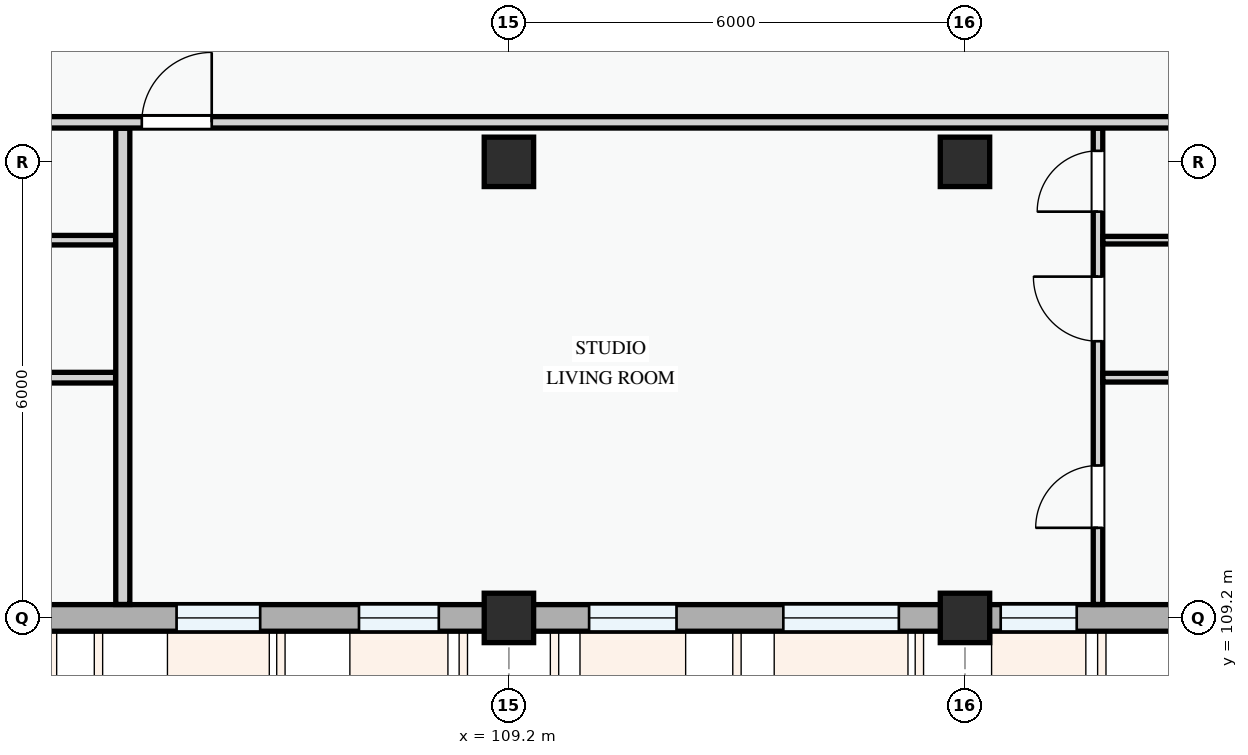
"""IFC4 building model, lengths in metres.
Left out: names, types, materials, properties, quantities, classifications, styles, units other than length and angle.
Written with IfcOpenShell. Run it as: python <this file> out.ifc"""

import sys

from ifc_helpers import new_model, si_unit, direction, frame, frame_2d, origin, origin_2d, place, context, subcontext, project, spatial, rectangle, extrude, element, fill, save


model = new_model("IFC4")
c1 = context("Model", 3, precision=1e-05, world=origin(), true_north=direction((0.0, 1.0)))
c2 = subcontext(c1, "Body", "Model", "MODEL_VIEW")
j1 = project(units=[si_unit("LENGTHUNIT", "METRE"), si_unit("PLANEANGLEUNIT", "RADIAN")], contexts=[c1])
p1 = place(None, origin())
s1 = spatial("IfcSite", under=j1, at=p1, CompositionType="ELEMENT")
p2 = place(p1, origin())
s2 = spatial("IfcBuilding", under=s1, at=p2, CompositionType="ELEMENT")
p3 = place(p2, frame((0.0, 0.0, 11.4)))
s3 = spatial("IfcBuildingStorey", under=s2, at=p3, CompositionType="ELEMENT", Elevation=11.4)
for number, where, z_axis, x_axis in (
    (1, (109.2, 109.2, 0.0), (0.0, 0.0, 1.0), (1.0, 0.0, 0.0)),
    (2, (109.2, 115.2, 0.0), (0.0, 0.0, 1.0), (1.0, 0.0, 0.0)),
    (3, (115.2, 109.2, 0.0), (0.0, 0.0, 1.0), (1.0, 0.0, 0.0)),
    (4, (115.2, 115.2, 0.0), (0.0, 0.0, 1.0), (1.0, 0.0, 0.0)),
):
    element("IfcColumn", number, at=place(p3, frame(where, z_axis=z_axis, x_axis=x_axis)), inside=s3, PredefinedType="COLUMN", context=c2, shape_type="SweptSolid", body=[
        extrude(rectangle(XDim=0.65, YDim=0.65, at=origin_2d()), origin(), (0.0, 0.0, 1.0), 3.3),
    ])
p4 = place(p3, frame((100.8, 109.2, 0.0), z_axis=(0.0, 0.0, 1.0), x_axis=(1.0, 0.0, 0.0)))
e5 = element("IfcWall", 5, at=p4, inside=s3, PredefinedType="STANDARD", context=c2, shape_type="SweptSolid", body=[
    extrude(rectangle(XDim=8.4, YDim=0.35, at=frame_2d((4.2, 0.0))), origin(), (0.0, 0.0, 1.0), 2.375),
])
p5 = place(p4, frame((1.18, 0.0, 0.78)))
e6 = element("IfcOpeningElement", 6, at=p5, cuts=e5, PredefinedType="OPENING", context=c2, shape_type="SweptSolid", body=[
    extrude(rectangle(XDim=1.15, YDim=1.25, at=frame_2d((0.575, 0.625))), frame((0.0, 0.185, 0.0), z_axis=(0.0, -1.0, 0.0), x_axis=(1.0, 0.0, 0.0)), (0.0, 0.0, 1.0), 0.37),
])
p6 = place(p4, frame((4.028, 0.0, 0.78)))
e7 = element("IfcOpeningElement", 7, at=p6, cuts=e5, PredefinedType="OPENING", context=c2, shape_type="SweptSolid", body=[
    extrude(rectangle(XDim=1.1, YDim=1.3, at=frame_2d((0.55, 0.65))), frame((0.0, 0.185, 0.0), z_axis=(0.0, -1.0, 0.0), x_axis=(1.0, 0.0, 0.0)), (0.0, 0.0, 1.0), 0.37),
])
p7 = place(p4, frame((6.427, 0.0, 0.78)))
e8 = element("IfcOpeningElement", 8, at=p7, cuts=e5, PredefinedType="OPENING", context=c2, shape_type="SweptSolid", body=[
    extrude(rectangle(XDim=1.05, YDim=1.2, at=frame_2d((0.525, 0.6))), frame((0.0, 0.185, 0.0), z_axis=(0.0, -1.0, 0.0), x_axis=(1.0, 0.0, 0.0)), (0.0, 0.0, 1.0), 0.37),
])
p8 = place(p3, frame((109.2, 109.2, 0.0), z_axis=(0.0, 0.0, 1.0), x_axis=(1.0, 0.0, 0.0)))
e9 = element("IfcWall", 9, at=p8, inside=s3, PredefinedType="STANDARD", context=c2, shape_type="SweptSolid", body=[
    extrude(rectangle(XDim=6.0, YDim=0.35, at=frame_2d((3.0, 0.0))), origin(), (0.0, 0.0, 1.0), 2.475),
])
p9 = place(p8, frame((1.055, 0.0, 0.78)))
e10 = element("IfcOpeningElement", 10, at=p9, cuts=e9, PredefinedType="OPENING", context=c2, shape_type="SweptSolid", body=[
    extrude(rectangle(XDim=1.15, YDim=1.25, at=frame_2d((0.575, 0.625))), frame((0.0, 0.185, 0.0), z_axis=(0.0, -1.0, 0.0), x_axis=(1.0, 0.0, 0.0)), (0.0, 0.0, 1.0), 0.37),
])
p10 = place(p8, frame((3.61, 0.0, 0.78)))
e11 = element("IfcOpeningElement", 11, at=p10, cuts=e9, PredefinedType="OPENING", context=c2, shape_type="SweptSolid", body=[
    extrude(rectangle(XDim=1.52, YDim=1.42, at=frame_2d((0.76, 0.71))), frame((0.0, 0.185, 0.0), z_axis=(0.0, -1.0, 0.0), x_axis=(1.0, 0.0, 0.0)), (0.0, 0.0, 1.0), 0.37),
])
p11 = place(p3, frame((115.2, 109.2, 0.0), z_axis=(0.0, 0.0, 1.0), x_axis=(1.0, 0.0, 0.0)))
e12 = element("IfcWall", 12, at=p11, inside=s3, PredefinedType="STANDARD", context=c2, shape_type="SweptSolid", body=[
    extrude(rectangle(XDim=8.4, YDim=0.35, at=frame_2d((4.2, 0.0))), origin(), (0.0, 0.0, 1.0), 2.375),
])
p12 = place(p11, frame((0.47, 0.0, 0.78)))
e13 = element("IfcOpeningElement", 13, at=p12, cuts=e12, PredefinedType="OPENING", context=c2, shape_type="SweptSolid", body=[
    extrude(rectangle(XDim=1.0, YDim=1.25, at=frame_2d((0.5, 0.625))), frame((0.0, 0.185, 0.0), z_axis=(0.0, -1.0, 0.0), x_axis=(1.0, 0.0, 0.0)), (0.0, 0.0, 1.0), 0.37),
])
p13 = place(p11, frame((2.95, 0.0, 0.78)))
e14 = element("IfcOpeningElement", 14, at=p13, cuts=e12, PredefinedType="OPENING", context=c2, shape_type="SweptSolid", body=[
    extrude(rectangle(XDim=0.9, YDim=1.2, at=frame_2d((0.45, 0.6))), frame((0.0, 0.185, 0.0), z_axis=(0.0, -1.0, 0.0), x_axis=(1.0, 0.0, 0.0)), (0.0, 0.0, 1.0), 0.37),
])
p14 = place(p11, frame((5.685, 0.0, 0.78)))
e15 = element("IfcOpeningElement", 15, at=p14, cuts=e12, PredefinedType="OPENING", context=c2, shape_type="SweptSolid", body=[
    extrude(rectangle(XDim=1.75, YDim=1.45, at=frame_2d((0.875, 0.725))), frame((0.0, 0.185, 0.0), z_axis=(0.0, -1.0, 0.0), x_axis=(1.0, 0.0, 0.0)), (0.0, 0.0, 1.0), 0.37),
])
p15 = place(p3, frame((92.342, 112.361, 0.0), z_axis=(0.0, 0.0, 1.0), x_axis=(1.0, 0.0, 0.0)))
e16 = element("IfcWall", 16, at=p15, inside=s3, PredefinedType="PARTITIONING", context=c2, shape_type="SweptSolid", body=[
    extrude(rectangle(XDim=11.683, YDim=0.14, at=frame_2d((5.842, 0.0))), origin(), (0.0, 0.0, 1.0), 3.0),
])
p16 = place(p3, frame((92.342, 114.17, 0.0), z_axis=(0.0, 0.0, 1.0), x_axis=(1.0, 0.0, 0.0)))
e17 = element("IfcWall", 17, at=p16, inside=s3, PredefinedType="PARTITIONING", context=c2, shape_type="SweptSolid", body=[
    extrude(rectangle(XDim=11.683, YDim=0.125, at=frame_2d((5.842, 0.0))), origin(), (0.0, 0.0, 1.0), 3.0),
])
p17 = place(p3, frame((116.95, 109.377, 0.0), z_axis=(0.0, 0.0, 1.0), x_axis=(0.0, 1.0, 0.0)))
e18 = element("IfcWall", 18, at=p17, inside=s3, PredefinedType="PARTITIONING", context=c2, shape_type="SweptSolid", body=[
    extrude(rectangle(XDim=6.266, YDim=0.125, at=frame_2d((3.133, 0.0))), origin(), (0.0, 0.0, 1.0), 3.0),
])
p18 = place(p17, frame((1.008, 0.0, 0.0)))
e19 = element("IfcOpeningElement", 19, at=p18, cuts=e18, PredefinedType="OPENING", context=c2, shape_type="SweptSolid", body=[
    extrude(rectangle(XDim=0.82, YDim=2.08, at=frame_2d((0.41, 1.04))), frame((0.0, 0.073, 0.0), z_axis=(0.0, -1.0, 0.0), x_axis=(1.0, 0.0, 0.0)), (0.0, 0.0, 1.0), 0.145),
])
p19 = place(p17, frame((3.463, 0.0, 0.0)))
e20 = element("IfcOpeningElement", 20, at=p19, cuts=e18, PredefinedType="OPENING", context=c2, shape_type="SweptSolid", body=[
    extrude(rectangle(XDim=0.85, YDim=2.1, at=frame_2d((0.425, 1.05))), frame((0.0, 0.073, 0.0), z_axis=(0.0, -1.0, 0.0), x_axis=(1.0, 0.0, 0.0)), (0.0, 0.0, 1.0), 0.145),
])
p20 = place(p17, frame((5.168, 0.0, 0.0)))
e21 = element("IfcOpeningElement", 21, at=p20, cuts=e18, PredefinedType="OPENING", context=c2, shape_type="SweptSolid", body=[
    extrude(rectangle(XDim=0.8, YDim=2.1, at=frame_2d((0.4, 1.05))), frame((0.0, 0.073, 0.0), z_axis=(0.0, -1.0, 0.0), x_axis=(1.0, 0.0, 0.0)), (0.0, 0.0, 1.0), 0.145),
])
p21 = place(p3, frame((117.014, 112.361, 0.0), z_axis=(0.0, 0.0, 1.0), x_axis=(1.0, 0.0, 0.0)))
e22 = element("IfcWall", 22, at=p21, inside=s3, PredefinedType="PARTITIONING", context=c2, shape_type="SweptSolid", body=[
    extrude(rectangle(XDim=10.654, YDim=0.115, at=frame_2d((5.327, 0.0))), origin(), (0.0, 0.0, 1.0), 3.0),
])
p22 = place(p3, frame((117.014, 114.17, 0.0), z_axis=(0.0, 0.0, 1.0), x_axis=(1.0, 0.0, 0.0)))
e23 = element("IfcWall", 23, at=p22, inside=s3, PredefinedType="PARTITIONING", context=c2, shape_type="SweptSolid", body=[
    extrude(rectangle(XDim=10.654, YDim=0.1, at=frame_2d((5.327, 0.0))), origin(), (0.0, 0.0, 1.0), 3.0),
])
p23 = place(p3, frame((104.12, 109.377, 0.0), z_axis=(0.0, 0.0, 1.0), x_axis=(0.0, 1.0, 0.0)))
e24 = element("IfcWall", 24, at=p23, inside=s3, PredefinedType="PARTITIONING", context=c2, shape_type="SweptSolid", body=[
    extrude(rectangle(XDim=6.266, YDim=0.185, at=frame_2d((3.133, 0.0))), origin(), (0.0, 0.0, 1.0), 3.0),
])
p24 = place(p3, frame((80.577, 115.72, 0.0), z_axis=(0.0, 0.0, 1.0), x_axis=(1.0, 0.0, 0.0)))
e25 = element("IfcWall", 25, at=p24, inside=s3, PredefinedType="PARTITIONING", context=c2, shape_type="SweptSolid", body=[
    extrude(rectangle(XDim=69.473, YDim=0.15, at=frame_2d((34.737, 0.0))), origin(), (0.0, 0.0, 1.0), 3.0),
])
p25 = place(p24, frame((9.531, 0.0, 0.0)))
e26 = element("IfcOpeningElement", 26, at=p25, cuts=e25, PredefinedType="OPENING", context=c2, shape_type="SweptSolid", body=[
    extrude(rectangle(XDim=0.92, YDim=2.1, at=frame_2d((0.46, 1.05))), frame((0.0, 0.085, 0.0), z_axis=(0.0, -1.0, 0.0), x_axis=(1.0, 0.0, 0.0)), (0.0, 0.0, 1.0), 0.17),
])
p26 = place(p24, frame((23.793, 0.0, 0.0)))
e27 = element("IfcOpeningElement", 27, at=p26, cuts=e25, PredefinedType="OPENING", context=c2, shape_type="SweptSolid", body=[
    extrude(rectangle(XDim=0.92, YDim=2.1, at=frame_2d((0.46, 1.05))), frame((0.0, 0.085, 0.0), z_axis=(0.0, -1.0, 0.0), x_axis=(1.0, 0.0, 0.0)), (0.0, 0.0, 1.0), 0.17),
])
p27 = place(p24, frame((52.74, 0.0, 0.0)))
e28 = element("IfcOpeningElement", 28, at=p27, cuts=e25, PredefinedType="OPENING", context=c2, shape_type="SweptSolid", body=[
    extrude(rectangle(XDim=0.92, YDim=2.1, at=frame_2d((0.46, 1.05))), frame((0.0, 0.085, 0.0), z_axis=(0.0, -1.0, 0.0), x_axis=(1.0, 0.0, 0.0)), (0.0, 0.0, 1.0), 0.17),
])
p28 = place(p6, origin())
e29 = element("IfcWindow", 29, at=p28, inside=s3, PartitioningType="SINGLE_PANEL", PredefinedType="WINDOW", context=c2, shape_type="SweptSolid", body=[
    extrude(rectangle(XDim=1.1, YDim=1.3, at=frame_2d((0.55, 0.65))), frame((0.0, 0.03, 0.0), z_axis=(0.0, -1.0, 0.0), x_axis=(1.0, 0.0, 0.0)), (0.0, 0.0, 1.0), 0.06),
])
fill(e7, e29)
p29 = place(p7, origin())
e30 = element("IfcWindow", 30, at=p29, inside=s3, PartitioningType="SINGLE_PANEL", PredefinedType="WINDOW", context=c2, shape_type="SweptSolid", body=[
    extrude(rectangle(XDim=1.05, YDim=1.2, at=frame_2d((0.525, 0.6))), frame((0.0, 0.03, 0.0), z_axis=(0.0, -1.0, 0.0), x_axis=(1.0, 0.0, 0.0)), (0.0, 0.0, 1.0), 0.06),
])
fill(e8, e30)
p30 = place(p9, origin())
e31 = element("IfcWindow", 31, at=p30, inside=s3, PartitioningType="SINGLE_PANEL", PredefinedType="WINDOW", context=c2, shape_type="SweptSolid", body=[
    extrude(rectangle(XDim=1.15, YDim=1.25, at=frame_2d((0.575, 0.625))), frame((0.0, 0.03, 0.0), z_axis=(0.0, -1.0, 0.0), x_axis=(1.0, 0.0, 0.0)), (0.0, 0.0, 1.0), 0.06),
])
fill(e10, e31)
p31 = place(p10, origin())
e32 = element("IfcWindow", 32, at=p31, inside=s3, PartitioningType="SINGLE_PANEL", PredefinedType="WINDOW", context=c2, shape_type="SweptSolid", body=[
    extrude(rectangle(XDim=1.52, YDim=1.42, at=frame_2d((0.76, 0.71))), frame((0.0, 0.03, 0.0), z_axis=(0.0, -1.0, 0.0), x_axis=(1.0, 0.0, 0.0)), (0.0, 0.0, 1.0), 0.06),
])
fill(e11, e32)
p32 = place(p12, origin())
e33 = element("IfcWindow", 33, at=p32, inside=s3, PartitioningType="SINGLE_PANEL", PredefinedType="WINDOW", context=c2, shape_type="SweptSolid", body=[
    extrude(rectangle(XDim=1.0, YDim=1.25, at=frame_2d((0.5, 0.625))), frame((0.0, 0.03, 0.0), z_axis=(0.0, -1.0, 0.0), x_axis=(1.0, 0.0, 0.0)), (0.0, 0.0, 1.0), 0.06),
])
fill(e13, e33)
p33 = place(p18, origin())
e34 = element("IfcDoor", 34, at=p33, inside=s3, OperationType="SINGLE_SWING_LEFT", PredefinedType="DOOR", context=c2, shape_type="SweptSolid", body=[
    extrude(rectangle(XDim=0.82, YDim=2.08, at=frame_2d((0.41, 1.04))), frame((0.0, 0.025, 0.0), z_axis=(0.0, -1.0, 0.0), x_axis=(1.0, 0.0, 0.0)), (0.0, 0.0, 1.0), 0.05),
])
fill(e19, e34)
p34 = place(p19, origin())
e35 = element("IfcDoor", 35, at=p34, inside=s3, OperationType="SINGLE_SWING_RIGHT", PredefinedType="DOOR", context=c2, shape_type="SweptSolid", body=[
    extrude(rectangle(XDim=0.85, YDim=2.1, at=frame_2d((0.425, 1.05))), frame((0.0, 0.025, 0.0), z_axis=(0.0, -1.0, 0.0), x_axis=(1.0, 0.0, 0.0)), (0.0, 0.0, 1.0), 0.05),
])
fill(e20, e35)
p35 = place(p20, origin())
e36 = element("IfcDoor", 36, at=p35, inside=s3, OperationType="SINGLE_SWING_LEFT", PredefinedType="DOOR", context=c2, shape_type="SweptSolid", body=[
    extrude(rectangle(XDim=0.8, YDim=2.1, at=frame_2d((0.4, 1.05))), frame((0.0, 0.025, 0.0), z_axis=(0.0, -1.0, 0.0), x_axis=(1.0, 0.0, 0.0)), (0.0, 0.0, 1.0), 0.05),
])
fill(e21, e36)
p36 = place(p26, origin())
e37 = element("IfcDoor", 37, at=p36, inside=s3, OperationType="SINGLE_SWING_RIGHT", PredefinedType="DOOR", context=c2, shape_type="SweptSolid", body=[
    extrude(rectangle(XDim=0.92, YDim=2.1, at=frame_2d((0.46, 1.05))), frame((0.0, 0.025, 0.0), z_axis=(0.0, -1.0, 0.0), x_axis=(1.0, 0.0, 0.0)), (0.0, 0.0, 1.0), 0.05),
])
fill(e27, e37)
save(model, sys.argv[1])
